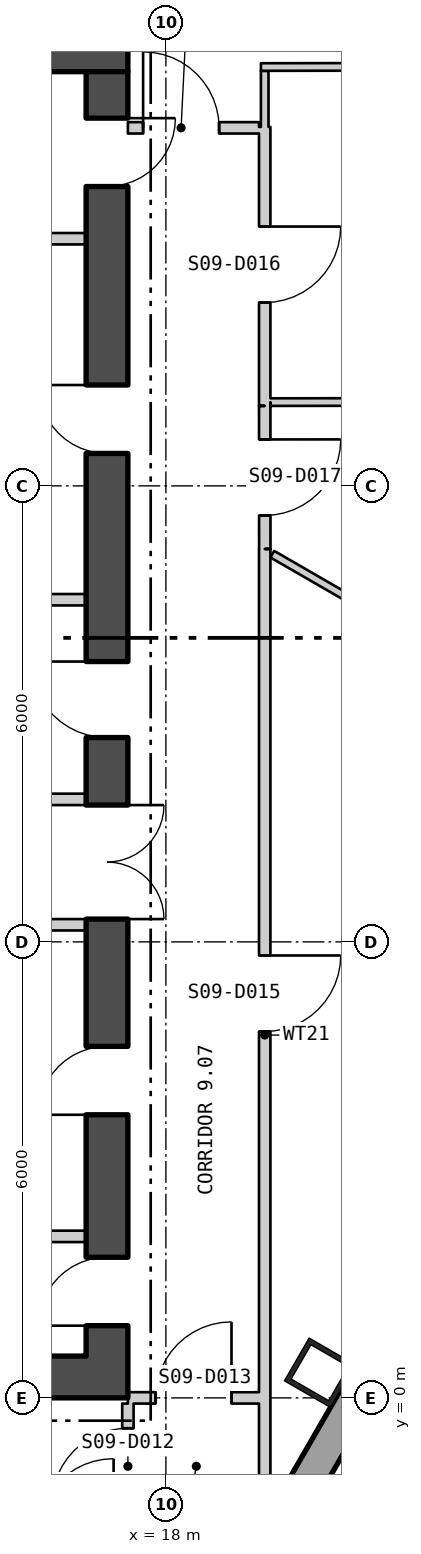
"""IFC4 building model, lengths in metres.
Left out: names, types, materials, properties, quantities, classifications, styles, units other than length and angle.
Written with IfcOpenShell. Run it as: python <this file> out.ifc"""

import sys

from ifc_helpers import new_model, si_unit, direction, frame, frame_2d, origin, origin_2d, place, context, subcontext, project, spatial, polyline, rectangle, hollow_rectangle, outline, extrude, element, fill, save


model = new_model("IFC4")
c1 = context("Model", 3, precision=1e-05, world=origin(), true_north=direction((0.0, 1.0)))
c2 = subcontext(c1, "Body", "Model", "MODEL_VIEW")
j1 = project(units=[si_unit("LENGTHUNIT", "METRE"), si_unit("PLANEANGLEUNIT", "RADIAN")], contexts=[c1])
p1 = place(None, origin())
s1 = spatial("IfcSite", under=j1, at=p1, CompositionType="ELEMENT")
p2 = place(p1, origin())
s2 = spatial("IfcBuilding", under=s1, at=p2, CompositionType="ELEMENT")
p3 = place(p2, frame((0.0, 0.0, 124.8)))
s3 = spatial("IfcBuildingStorey", under=s2, at=p3, CompositionType="ELEMENT", Elevation=124.8)
p4 = place(p3, frame((20.025, 0.331, 0.0), z_axis=(0.0, 0.0, 1.0), x_axis=(0.5, 0.866025403784, 0.0)))
e1 = element("IfcColumn", 1, at=p4, inside=s3, PredefinedType="COLUMN", context=c2, shape_type="SweptSolid", body=[
    extrude(hollow_rectangle(XDim=0.65, YDim=0.7, WallThickness=0.065, at=origin_2d()), origin(), (0.0, 0.0, 1.0), 4.5),
])
p5 = place(p3, frame((4.58, -27.57, -0.18), z_axis=(0.0, 0.0, 1.0), x_axis=(0.500000711659, 0.866024992908, 0.0)))
e2 = element("IfcWall", 2, at=p5, inside=s3, PredefinedType="SOLIDWALL", context=c2, shape_type="SweptSolid", body=[
    extrude(outline(polyline([(-0.13, -0.225), (45.87, -0.225), (45.61, 0.225), (0.13, 0.225), (-0.13, -0.225)])), origin(), (0.0, 0.0, 1.0), 4.28),
])
p6 = place(p5, frame((1.424, 0.0, 1.08)))
e3 = element("IfcOpeningElement", 3, at=p6, cuts=e2, PredefinedType="OPENING", context=c2, shape_type="SweptSolid", body=[
    extrude(rectangle(XDim=2.4, YDim=2.6, at=frame_2d((1.2, 1.3))), frame((0.0, 0.235, 0.0), z_axis=(0.0, -1.0, 0.0), x_axis=(1.0, 0.0, 0.0)), (0.0, 0.0, 1.0), 0.47),
])
p7 = place(p5, frame((5.893, 0.0, 1.08)))
e4 = element("IfcOpeningElement", 4, at=p7, cuts=e2, PredefinedType="OPENING", context=c2, shape_type="SweptSolid", body=[
    extrude(rectangle(XDim=2.4, YDim=2.6, at=frame_2d((1.2, 1.3))), frame((0.0, 0.235, 0.0), z_axis=(0.0, -1.0, 0.0), x_axis=(1.0, 0.0, 0.0)), (0.0, 0.0, 1.0), 0.47),
])
p8 = place(p5, frame((10.401, 0.0, 1.08)))
e5 = element("IfcOpeningElement", 5, at=p8, cuts=e2, PredefinedType="OPENING", context=c2, shape_type="SweptSolid", body=[
    extrude(rectangle(XDim=2.4, YDim=2.6, at=frame_2d((1.2, 1.3))), frame((0.0, 0.235, 0.0), z_axis=(0.0, -1.0, 0.0), x_axis=(1.0, 0.0, 0.0)), (0.0, 0.0, 1.0), 0.47),
])
p9 = place(p5, frame((14.909, 0.0, 1.08)))
e6 = element("IfcOpeningElement", 6, at=p9, cuts=e2, PredefinedType="OPENING", context=c2, shape_type="SweptSolid", body=[
    extrude(rectangle(XDim=2.4, YDim=2.6, at=frame_2d((1.2, 1.3))), frame((0.0, 0.235, 0.0), z_axis=(0.0, -1.0, 0.0), x_axis=(1.0, 0.0, 0.0)), (0.0, 0.0, 1.0), 0.47),
])
p10 = place(p5, frame((19.416, 0.0, 1.08)))
e7 = element("IfcOpeningElement", 7, at=p10, cuts=e2, PredefinedType="OPENING", context=c2, shape_type="SweptSolid", body=[
    extrude(rectangle(XDim=2.4, YDim=2.6, at=frame_2d((1.2, 1.3))), frame((0.0, 0.235, 0.0), z_axis=(0.0, -1.0, 0.0), x_axis=(1.0, 0.0, 0.0)), (0.0, 0.0, 1.0), 0.47),
])
p11 = place(p5, frame((23.924, 0.0, 1.08)))
e8 = element("IfcOpeningElement", 8, at=p11, cuts=e2, PredefinedType="OPENING", context=c2, shape_type="SweptSolid", body=[
    extrude(rectangle(XDim=2.4, YDim=2.6, at=frame_2d((1.2, 1.3))), frame((0.0, 0.235, 0.0), z_axis=(0.0, -1.0, 0.0), x_axis=(1.0, 0.0, 0.0)), (0.0, 0.0, 1.0), 0.47),
])
p12 = place(p5, frame((32.939, 0.0, 1.08)))
e9 = element("IfcOpeningElement", 9, at=p12, cuts=e2, PredefinedType="OPENING", context=c2, shape_type="SweptSolid", body=[
    extrude(rectangle(XDim=2.4, YDim=2.6, at=frame_2d((1.2, 1.3))), frame((0.0, 0.235, 0.0), z_axis=(0.0, -1.0, 0.0), x_axis=(1.0, 0.0, 0.0)), (0.0, 0.0, 1.0), 0.47),
])
p13 = place(p5, frame((37.447, 0.0, 1.08)))
e10 = element("IfcOpeningElement", 10, at=p13, cuts=e2, PredefinedType="OPENING", context=c2, shape_type="SweptSolid", body=[
    extrude(rectangle(XDim=2.4, YDim=2.6, at=frame_2d((1.2, 1.3))), frame((0.0, 0.235, 0.0), z_axis=(0.0, -1.0, 0.0), x_axis=(1.0, 0.0, 0.0)), (0.0, 0.0, 1.0), 0.47),
])
p14 = place(p5, frame((41.916, 0.0, 1.08)))
e11 = element("IfcOpeningElement", 11, at=p14, cuts=e2, PredefinedType="OPENING", context=c2, shape_type="SweptSolid", body=[
    extrude(rectangle(XDim=2.4, YDim=2.6, at=frame_2d((1.2, 1.3))), frame((0.0, 0.235, 0.0), z_axis=(0.0, -1.0, 0.0), x_axis=(1.0, 0.0, 0.0)), (0.0, 0.0, 1.0), 0.47),
])
p15 = place(p3, frame((-17.5, 0.275, 0.0), z_axis=(0.0, 0.0, 1.0), x_axis=(1.0, 0.0, 0.0)))
e12 = element("IfcWall", 12, at=p15, inside=s3, PredefinedType="SHEAR", context=c2, shape_type="SweptSolid", body=[
    extrude(rectangle(XDim=35.0, YDim=0.55, at=frame_2d((17.5, 0.0))), origin(), (0.0, 0.0, 1.0), 4.3),
])
p16 = place(p15, frame((12.0, 0.0, 0.0)))
e13 = element("IfcOpeningElement", 13, at=p16, cuts=e12, PredefinedType="OPENING", context=c2, shape_type="SweptSolid", body=[
    extrude(rectangle(XDim=1.8, YDim=2.4, at=frame_2d((0.9, 1.2))), frame((0.0, 0.285, 0.0), z_axis=(0.0, -1.0, 0.0), x_axis=(1.0, 0.0, 0.0)), (0.0, 0.0, 1.0), 0.57),
])
p17 = place(p15, frame((22.0, 0.0, 0.0)))
e14 = element("IfcOpeningElement", 14, at=p17, cuts=e12, PredefinedType="OPENING", context=c2, shape_type="SweptSolid", body=[
    extrude(rectangle(XDim=1.8, YDim=2.4, at=frame_2d((0.9, 1.2))), frame((0.0, 0.285, 0.0), z_axis=(0.0, -1.0, 0.0), x_axis=(1.0, 0.0, 0.0)), (0.0, 0.0, 1.0), 0.57),
])
p18 = place(p3, frame((-17.5, 17.725, 0.0), z_axis=(0.0, 0.0, 1.0), x_axis=(1.0, 0.0, 0.0)))
e15 = element("IfcWall", 15, at=p18, inside=s3, PredefinedType="SHEAR", context=c2, shape_type="SweptSolid", body=[
    extrude(rectangle(XDim=35.0, YDim=0.55, at=frame_2d((17.5, 0.0))), origin(), (0.0, 0.0, 1.0), 4.3),
])
p19 = place(p3, frame((17.225, 0.55, 0.0), z_axis=(0.0, 0.0, 1.0), x_axis=(0.0, 1.0, 0.0)))
e16 = element("IfcWall", 16, at=p19, inside=s3, PredefinedType="SHEAR", context=c2, shape_type="SweptSolid", body=[
    extrude(rectangle(XDim=16.9, YDim=0.55, at=frame_2d((8.45, 0.0))), origin(), (0.0, 0.0, 1.0), 4.3),
])
p20 = place(p19, frame((5.75, 0.0, 0.0)))
e17 = element("IfcOpeningElement", 17, at=p20, cuts=e16, PredefinedType="OPENING", context=c2, shape_type="SweptSolid", body=[
    extrude(rectangle(XDim=1.5, YDim=2.1, at=frame_2d((0.75, 1.05))), frame((0.0, 0.285, 0.0), z_axis=(0.0, -1.0, 0.0), x_axis=(1.0, 0.0, 0.0)), (0.0, 0.0, 1.0), 0.57),
])
p21 = place(p19, frame((0.4, 0.0, 0.0)))
e18 = element("IfcOpeningElement", 18, at=p21, cuts=e16, PredefinedType="OPENING", context=c2, shape_type="SweptSolid", body=[
    extrude(rectangle(XDim=0.9, YDim=2.1, at=frame_2d((0.45, 1.05))), frame((0.0, 0.285, 0.0), z_axis=(0.0, -1.0, 0.0), x_axis=(1.0, 0.0, 0.0)), (0.0, 0.0, 1.0), 0.57),
])
p22 = place(p19, frame((3.175, 0.0, 0.0)))
e19 = element("IfcOpeningElement", 19, at=p22, cuts=e16, PredefinedType="OPENING", context=c2, shape_type="SweptSolid", body=[
    extrude(rectangle(XDim=0.9, YDim=2.1, at=frame_2d((0.45, 1.05))), frame((0.0, 0.285, 0.0), z_axis=(0.0, -1.0, 0.0), x_axis=(1.0, 0.0, 0.0)), (0.0, 0.0, 1.0), 0.57),
])
p23 = place(p19, frame((8.139, 0.0, 0.0)))
e20 = element("IfcOpeningElement", 20, at=p23, cuts=e16, PredefinedType="OPENING", context=c2, shape_type="SweptSolid", body=[
    extrude(rectangle(XDim=1.0, YDim=2.1, at=frame_2d((0.5, 1.05))), frame((0.0, 0.285, 0.0), z_axis=(0.0, -1.0, 0.0), x_axis=(1.0, 0.0, 0.0)), (0.0, 0.0, 1.0), 0.57),
])
p24 = place(p19, frame((11.877, 0.0, 0.0)))
e21 = element("IfcOpeningElement", 21, at=p24, cuts=e16, PredefinedType="OPENING", context=c2, shape_type="SweptSolid", body=[
    extrude(rectangle(XDim=0.9, YDim=2.1, at=frame_2d((0.45, 1.05))), frame((0.0, 0.285, 0.0), z_axis=(0.0, -1.0, 0.0), x_axis=(1.0, 0.0, 0.0)), (0.0, 0.0, 1.0), 0.57),
])
p25 = place(p19, frame((15.389, 0.0, 0.0)))
e22 = element("IfcOpeningElement", 22, at=p25, cuts=e16, PredefinedType="OPENING", context=c2, shape_type="SweptSolid", body=[
    extrude(rectangle(XDim=0.9, YDim=2.1, at=frame_2d((0.45, 1.05))), frame((0.0, 0.285, 0.0), z_axis=(0.0, -1.0, 0.0), x_axis=(1.0, 0.0, 0.0)), (0.0, 0.0, 1.0), 0.57),
])
for number, where, z_axis, x_axis in (
    (23, (14.5, 6.225, 0.0), (0.0, 0.0, 1.0), (1.0, 0.0, 0.0)),
    (24, (14.5, 7.875, 0.0), (0.0, 0.0, 1.0), (1.0, 0.0, 0.0)),
    (25, (14.5, 2.125, 0.0), (0.0, 0.0, 1.0), (1.0, 0.0, 0.0)),
    (26, (14.5, 10.502, 0.0), (0.0, 0.0, 1.0), (1.0, 0.0, 0.0)),
    (27, (14.5, 15.252, 0.0), (0.0, 0.0, 1.0), (1.0, 0.0, 0.0)),
):
    element("IfcWall", number, at=place(p3, frame(where, z_axis=z_axis, x_axis=x_axis)), inside=s3, PredefinedType="PARTITIONING", context=c2, shape_type="SweptSolid", body=[
        extrude(rectangle(XDim=2.45, YDim=0.15, at=frame_2d((1.225, 0.0))), origin(), (0.0, 0.0, 1.0), 4.3),
    ])
p26 = place(p3, frame((17.5, -1.725, 0.0), z_axis=(0.0, 0.0, 1.0), x_axis=(0.0, 1.0, 0.0)))
e28 = element("IfcWall", 28, at=p26, inside=s3, PredefinedType="PARTITIONING", context=c2, shape_type="SweptSolid", body=[
    extrude(rectangle(XDim=1.65, YDim=0.15, at=frame_2d((0.825, 0.0))), origin(), (0.0, 0.0, 1.0), 4.3),
])
p27 = place(p26, frame((0.325, 0.0, 0.0)))
e29 = element("IfcOpeningElement", 29, at=p27, cuts=e28, PredefinedType="OPENING", context=c2, shape_type="SweptSolid", body=[
    extrude(rectangle(XDim=1.0, YDim=2.1, at=frame_2d((0.5, 1.05))), frame((0.0, 0.085, 0.0), z_axis=(0.0, -1.0, 0.0), x_axis=(1.0, 0.0, 0.0)), (0.0, 0.0, 1.0), 0.17),
])
p28 = place(p3, frame((17.5, 0.0, 0.0), z_axis=(0.0, 0.0, 1.0), x_axis=(1.0, 0.0, 0.0)))
e30 = element("IfcWall", 30, at=p28, inside=s3, PredefinedType="PARTITIONING", context=c2, shape_type="SweptSolid", body=[
    extrude(rectangle(XDim=1.725, YDim=0.15, at=frame_2d((0.863, 0.0))), origin(), (0.0, 0.0, 1.0), 3.7),
])
p29 = place(p28, frame((0.363, 0.0, 0.0)))
e31 = element("IfcOpeningElement", 31, at=p29, cuts=e30, PredefinedType="OPENING", context=c2, shape_type="SweptSolid", body=[
    extrude(rectangle(XDim=1.0, YDim=2.1, at=frame_2d((0.5, 1.05))), frame((0.0, 0.085, 0.0), z_axis=(0.0, -1.0, 0.0), x_axis=(1.0, 0.0, 0.0)), (0.0, 0.0, 1.0), 0.17),
])
p30 = place(p3, frame((17.5, 16.711, 0.0), z_axis=(0.0, 0.0, 1.0), x_axis=(1.0, 0.0, 0.0)))
e32 = element("IfcWall", 32, at=p30, inside=s3, PredefinedType="PARTITIONING", context=c2, shape_type="SweptSolid", body=[
    extrude(rectangle(XDim=1.725, YDim=0.15, at=frame_2d((0.863, 0.0))), origin(), (0.0, 0.0, 1.0), 4.3),
])
p31 = place(p30, frame((0.2, 0.0, 0.0)))
e33 = element("IfcOpeningElement", 33, at=p31, cuts=e32, PredefinedType="OPENING", context=c2, shape_type="SweptSolid", body=[
    extrude(rectangle(XDim=1.0, YDim=2.1, at=frame_2d((0.5, 1.05))), frame((0.0, 0.085, 0.0), z_axis=(0.0, -1.0, 0.0), x_axis=(1.0, 0.0, 0.0)), (0.0, 0.0, 1.0), 0.17),
])
p32 = place(p3, frame((19.25, 17.511, 0.0), z_axis=(0.0, 0.0, 1.0), x_axis=(0.999998926819, 0.001465046565, 0.0)))
e34 = element("IfcWall", 34, at=p32, inside=s3, PredefinedType="PARTITIONING", context=c2, shape_type="SweptSolid", body=[
    extrude(rectangle(XDim=4.778, YDim=0.1, at=frame_2d((2.389, 0.0))), origin(), (0.0, 0.0, 1.0), 4.3),
])
p33 = place(p3, frame((19.3, -1.622, 0.0), z_axis=(0.0, 0.0, 1.0), x_axis=(0.0, 1.0, 0.0)))
e35 = element("IfcWall", 35, at=p33, inside=s3, PredefinedType="PARTITIONING", context=c2, shape_type="SweptSolid", body=[
    extrude(rectangle(XDim=12.792, YDim=0.15, at=frame_2d((6.396, 0.0))), origin(), (0.0, 0.0, 1.0), 4.3),
])
p34 = place(p33, frame((6.443, 0.0, 0.0)))
e36 = element("IfcOpeningElement", 36, at=p34, cuts=e35, PredefinedType="OPENING", context=c2, shape_type="SweptSolid", body=[
    extrude(rectangle(XDim=1.0, YDim=2.1, at=frame_2d((0.5, 1.05))), frame((0.0, 0.085, 0.0), z_axis=(0.0, -1.0, 0.0), x_axis=(1.0, 0.0, 0.0)), (0.0, 0.0, 1.0), 0.17),
])
p35 = place(p3, frame((19.3, 13.052, 0.0), z_axis=(0.0, 0.0, 1.0), x_axis=(0.0, 1.0, 0.0)))
e37 = element("IfcWall", 37, at=p35, inside=s3, PredefinedType="PARTITIONING", context=c2, shape_type="SweptSolid", body=[
    extrude(rectangle(XDim=3.671, YDim=0.15, at=frame_2d((1.835, 0.0))), origin(), (0.0, 0.0, 1.0), 4.3),
])
p36 = place(p35, frame((1.36, 0.0, 0.0)))
e38 = element("IfcOpeningElement", 38, at=p36, cuts=e37, PredefinedType="OPENING", context=c2, shape_type="SweptSolid", body=[
    extrude(rectangle(XDim=1.0, YDim=2.1, at=frame_2d((0.5, 1.05))), frame((0.0, 0.085, 0.0), z_axis=(0.0, -1.0, 0.0), x_axis=(1.0, 0.0, 0.0)), (0.0, 0.0, 1.0), 0.17),
])
p37 = place(p3, frame((19.3, 16.723, 0.0), z_axis=(0.0, 0.0, 1.0), x_axis=(0.0, 1.0, 0.0)))
e39 = element("IfcWall", 39, at=p37, inside=s3, PredefinedType="PARTITIONING", context=c2, shape_type="SweptSolid", body=[
    extrude(rectangle(XDim=0.738, YDim=0.1, at=frame_2d((0.369, 0.0))), origin(), (0.0, 0.0, 1.0), 4.3),
])
p38 = place(p3, frame((19.3, 13.052, 0.0), z_axis=(0.0, 0.0, 1.0), x_axis=(0.000531349553, -0.999999858834, 0.0)))
e40 = element("IfcWall", 40, at=p38, inside=s3, PredefinedType="PARTITIONING", context=c2, shape_type="SweptSolid", body=[
    extrude(rectangle(XDim=1.882, YDim=0.15, at=frame_2d((0.941, 0.0))), origin(), (0.0, 0.0, 1.0), 4.3),
])
p39 = place(p38, frame((0.441, 0.0, 0.0)))
e41 = element("IfcOpeningElement", 41, at=p39, cuts=e40, PredefinedType="OPENING", context=c2, shape_type="SweptSolid", body=[
    extrude(rectangle(XDim=1.0, YDim=2.1, at=frame_2d((0.5, 1.05))), frame((0.0, 0.085, 0.0), z_axis=(0.0, -1.0, 0.0), x_axis=(1.0, 0.0, 0.0)), (0.0, 0.0, 1.0), 0.17),
])
p40 = place(p3, frame((19.375, 13.102, 0.0), z_axis=(0.0, 0.0, 1.0), x_axis=(0.999999382374, 0.001111419152, 0.0)))
e42 = element("IfcWall", 42, at=p40, inside=s3, PredefinedType="PARTITIONING", context=c2, shape_type="SweptSolid", body=[
    extrude(rectangle(XDim=7.198, YDim=0.1, at=frame_2d((3.599, 0.0))), origin(), (0.0, 0.0, 1.0), 4.3),
])
p41 = place(p3, frame((19.4, 11.101, 0.0), z_axis=(0.0, 0.0, 1.0), x_axis=(0.866048401274, -0.499960165064, 0.0)))
e43 = element("IfcWall", 43, at=p41, inside=s3, PredefinedType="PARTITIONING", context=c2, shape_type="SweptSolid", body=[
    extrude(rectangle(XDim=5.827, YDim=0.1, at=frame_2d((2.913, 0.0))), origin(), (0.0, 0.0, 1.0), 4.3),
])
p42 = place(p20, origin())
e44 = element("IfcDoor", 44, at=p42, inside=s3, OperationType="DOUBLE_DOOR_SINGLE_SWING", PredefinedType="DOOR", context=c2, shape_type="SweptSolid", body=[
    extrude(rectangle(XDim=1.5, YDim=2.1, at=frame_2d((0.75, 1.05))), frame((0.0, 0.025, 0.0), z_axis=(0.0, -1.0, 0.0), x_axis=(1.0, 0.0, 0.0)), (0.0, 0.0, 1.0), 0.05),
])
fill(e17, e44)
p43 = place(p21, origin())
e45 = element("IfcDoor", 45, at=p43, inside=s3, OperationType="SINGLE_SWING_RIGHT", PredefinedType="DOOR", context=c2, shape_type="SweptSolid", body=[
    extrude(rectangle(XDim=0.9, YDim=2.1, at=frame_2d((0.45, 1.05))), frame((0.0, 0.025, 0.0), z_axis=(0.0, -1.0, 0.0), x_axis=(1.0, 0.0, 0.0)), (0.0, 0.0, 1.0), 0.05),
])
fill(e18, e45)
p44 = place(p22, origin())
e46 = element("IfcDoor", 46, at=p44, inside=s3, OperationType="SINGLE_SWING_RIGHT", PredefinedType="DOOR", context=c2, shape_type="SweptSolid", body=[
    extrude(rectangle(XDim=0.9, YDim=2.1, at=frame_2d((0.45, 1.05))), frame((0.0, 0.025, 0.0), z_axis=(0.0, -1.0, 0.0), x_axis=(1.0, 0.0, 0.0)), (0.0, 0.0, 1.0), 0.05),
])
fill(e19, e46)
p45 = place(p23, origin())
e47 = element("IfcDoor", 47, at=p45, inside=s3, OperationType="SINGLE_SWING_LEFT", PredefinedType="DOOR", context=c2, shape_type="SweptSolid", body=[
    extrude(rectangle(XDim=1.0, YDim=2.1, at=frame_2d((0.5, 1.05))), frame((0.0, 0.025, 0.0), z_axis=(0.0, -1.0, 0.0), x_axis=(1.0, 0.0, 0.0)), (0.0, 0.0, 1.0), 0.05),
])
fill(e20, e47)
p46 = place(p24, origin())
e48 = element("IfcDoor", 48, at=p46, inside=s3, OperationType="SINGLE_SWING_LEFT", PredefinedType="DOOR", context=c2, shape_type="SweptSolid", body=[
    extrude(rectangle(XDim=0.9, YDim=2.1, at=frame_2d((0.45, 1.05))), frame((0.0, 0.025, 0.0), z_axis=(0.0, -1.0, 0.0), x_axis=(1.0, 0.0, 0.0)), (0.0, 0.0, 1.0), 0.05),
])
fill(e21, e48)
p47 = place(p25, origin())
e49 = element("IfcDoor", 49, at=p47, inside=s3, OperationType="SINGLE_SWING_RIGHT", PredefinedType="DOOR", context=c2, shape_type="SweptSolid", body=[
    extrude(rectangle(XDim=0.9, YDim=2.1, at=frame_2d((0.45, 1.05))), frame((0.0, 0.025, 0.0), z_axis=(0.0, -1.0, 0.0), x_axis=(1.0, 0.0, 0.0)), (0.0, 0.0, 1.0), 0.05),
])
fill(e22, e49)
p48 = place(p27, origin())
e50 = element("IfcDoor", 50, at=p48, inside=s3, OperationType="SINGLE_SWING_RIGHT", PredefinedType="DOOR", context=c2, shape_type="SweptSolid", body=[
    extrude(rectangle(XDim=1.0, YDim=2.1, at=frame_2d((0.5, 1.05))), frame((0.0, 0.025, 0.0), z_axis=(0.0, -1.0, 0.0), x_axis=(1.0, 0.0, 0.0)), (0.0, 0.0, 1.0), 0.05),
])
fill(e29, e50)
p49 = place(p29, origin())
e51 = element("IfcDoor", 51, at=p49, inside=s3, OperationType="SINGLE_SWING_LEFT", PredefinedType="DOOR", context=c2, shape_type="SweptSolid", body=[
    extrude(rectangle(XDim=1.0, YDim=2.1, at=frame_2d((0.5, 1.05))), frame((0.0, 0.025, 0.0), z_axis=(0.0, -1.0, 0.0), x_axis=(1.0, 0.0, 0.0)), (0.0, 0.0, 1.0), 0.05),
])
fill(e31, e51)
p50 = place(p31, origin())
e52 = element("IfcDoor", 52, at=p50, inside=s3, OperationType="SINGLE_SWING_RIGHT", PredefinedType="DOOR", context=c2, shape_type="SweptSolid", body=[
    extrude(rectangle(XDim=1.0, YDim=2.1, at=frame_2d((0.5, 1.05))), frame((0.0, 0.025, 0.0), z_axis=(0.0, -1.0, 0.0), x_axis=(1.0, 0.0, 0.0)), (0.0, 0.0, 1.0), 0.05),
])
fill(e33, e52)
p51 = place(p34, origin())
e53 = element("IfcDoor", 53, at=p51, inside=s3, OperationType="SINGLE_SWING_RIGHT", PredefinedType="DOOR", context=c2, shape_type="SweptSolid", body=[
    extrude(rectangle(XDim=1.0, YDim=2.1, at=frame_2d((0.5, 1.05))), frame((0.0, 0.025, 0.0), z_axis=(0.0, -1.0, 0.0), x_axis=(1.0, 0.0, 0.0)), (0.0, 0.0, 1.0), 0.05),
])
fill(e36, e53)
p52 = place(p36, origin())
e54 = element("IfcDoor", 54, at=p52, inside=s3, OperationType="SINGLE_SWING_RIGHT", PredefinedType="DOOR", context=c2, shape_type="SweptSolid", body=[
    extrude(rectangle(XDim=1.0, YDim=2.1, at=frame_2d((0.5, 1.05))), frame((0.0, 0.025, 0.0), z_axis=(0.0, -1.0, 0.0), x_axis=(1.0, 0.0, 0.0)), (0.0, 0.0, 1.0), 0.05),
])
fill(e38, e54)
p53 = place(p39, origin())
e55 = element("IfcDoor", 55, at=p53, inside=s3, OperationType="SINGLE_SWING_RIGHT", PredefinedType="DOOR", context=c2, shape_type="SweptSolid", body=[
    extrude(rectangle(XDim=1.0, YDim=2.1, at=frame_2d((0.5, 1.05))), frame((0.0, 0.025, 0.0), z_axis=(0.0, -1.0, 0.0), x_axis=(1.0, 0.0, 0.0)), (0.0, 0.0, 1.0), 0.05),
])
fill(e41, e55)
save(model, sys.argv[1])
